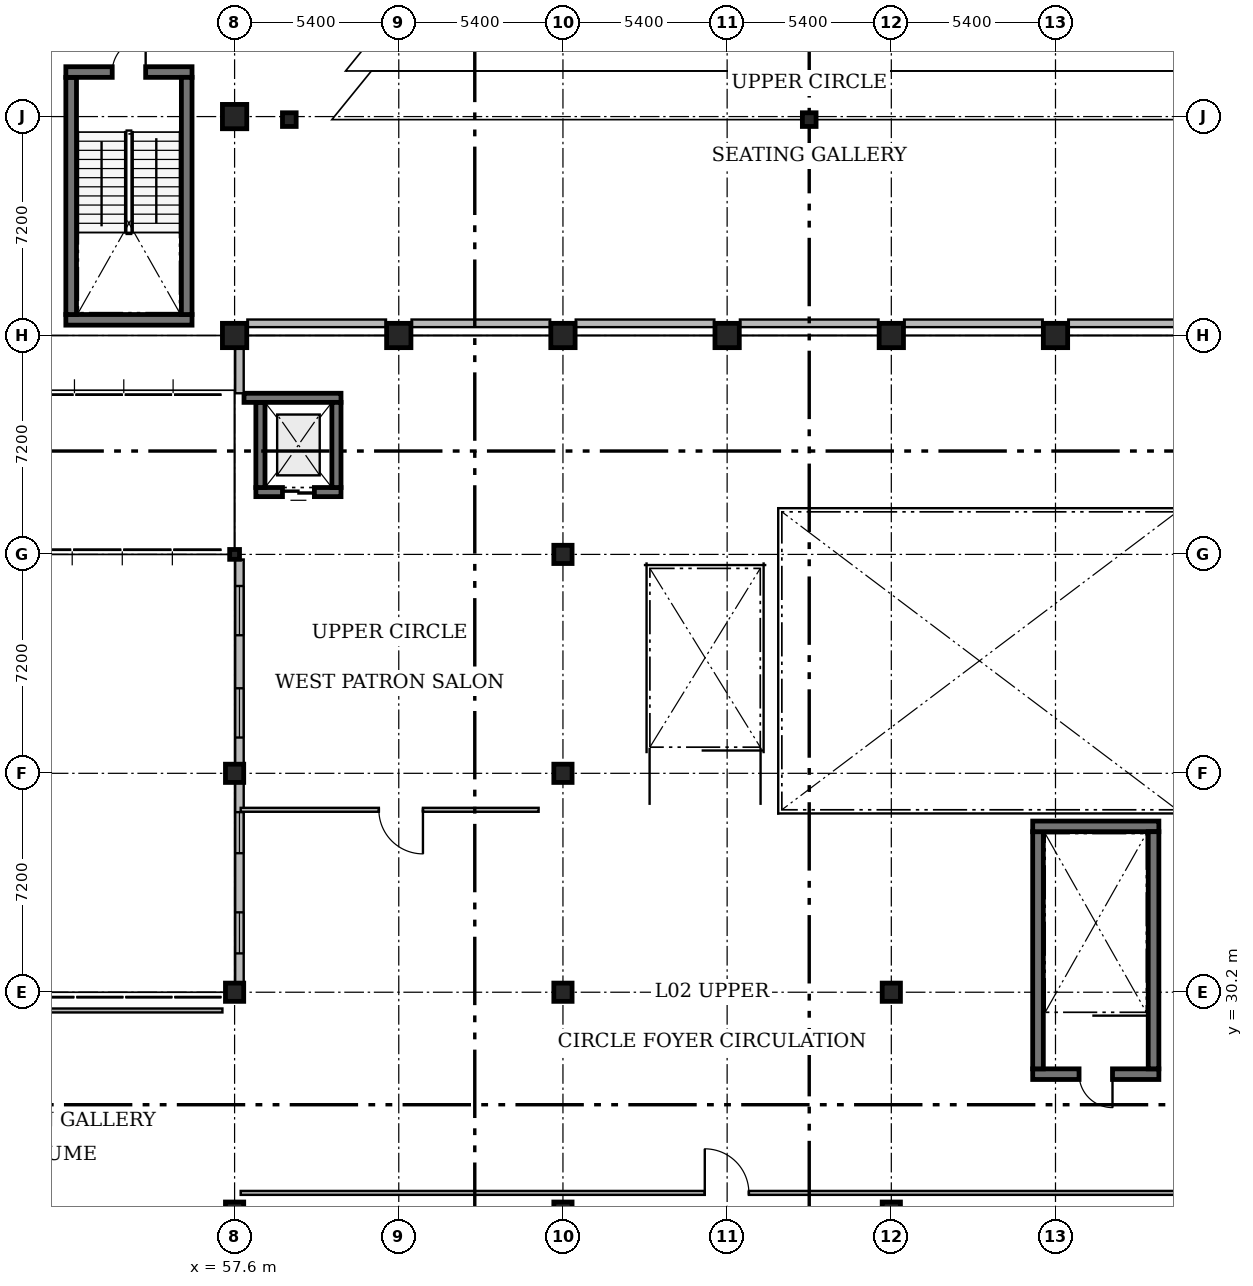
"""IFC4 building model, lengths in metres.
Left out: names, types, materials, properties, quantities, classifications, styles, units other than length and angle.
Written with IfcOpenShell. Run it as: python <this file> out.ifc"""

import sys

from ifc_helpers import new_model, si_unit, direction, frame, frame_2d, origin, origin_2d, place, context, subcontext, project, spatial, rectangle, circle, hollow_circle, extrude, element, fill, save


model = new_model("IFC4")
c1 = context("Model", 3, precision=1e-05, world=origin(), true_north=direction((0.0, 1.0)))
c2 = subcontext(c1, "Body", "Model", "MODEL_VIEW")
j1 = project(units=[si_unit("LENGTHUNIT", "METRE"), si_unit("PLANEANGLEUNIT", "RADIAN")], contexts=[c1])
p1 = place(None, origin())
s1 = spatial("IfcSite", under=j1, at=p1, CompositionType="ELEMENT")
p2 = place(p1, origin())
s2 = spatial("IfcBuilding", under=s1, at=p2, CompositionType="ELEMENT")
p3 = place(p2, frame((0.0, 0.0, 9.0)))
s3 = spatial("IfcBuildingStorey", under=s2, at=p3, CompositionType="ELEMENT", Elevation=9.0)
for number, where, z_axis, x_axis in (
    (1, (68.4, 23.0, 0.0), (0.0, 0.0, 1.0), (1.0, 0.0, 0.0)),
    (2, (68.4, 30.2, 0.0), (0.0, 0.0, 1.0), (1.0, 0.0, 0.0)),
    (3, (68.4, 37.4, 0.0), (0.0, 0.0, 1.0), (1.0, 0.0, 0.0)),
    (4, (68.4, 44.6, 0.0), (0.0, 0.0, 1.0), (1.0, 0.0, 0.0)),
):
    element("IfcColumn", number, at=place(p3, frame(where, z_axis=z_axis, x_axis=x_axis)), inside=s3, PredefinedType="COLUMN", context=c2, shape_type="SweptSolid", body=[
        extrude(circle(Radius=0.3, at=origin_2d()), origin(), (0.0, 0.0, 1.0), 4.2),
    ])
for number, where, z_axis, x_axis in (
    (5, (68.4, 51.8, 0.0), (0.0, 0.0, 1.0), (1.0, 0.0, 0.0)),
    (6, (73.8, 51.8, 0.0), (0.0, 0.0, 1.0), (1.0, 0.0, 0.0)),
):
    element("IfcColumn", number, at=place(p3, frame(where, z_axis=z_axis, x_axis=x_axis)), inside=s3, PredefinedType="COLUMN", context=c2, shape_type="SweptSolid", body=[
        extrude(rectangle(XDim=0.8, YDim=0.8, at=origin_2d()), origin(), (0.0, 0.0, 1.0), 4.2),
    ])
for number, where, z_axis, x_axis in (
    (7, (79.2, 23.0, 0.0), (0.0, 0.0, 1.0), (1.0, 0.0, 0.0)),
    (8, (79.2, 30.2, 0.0), (0.0, 0.0, 1.0), (1.0, 0.0, 0.0)),
):
    element("IfcColumn", number, at=place(p3, frame(where, z_axis=z_axis, x_axis=x_axis)), inside=s3, PredefinedType="COLUMN", context=c2, shape_type="SweptSolid", body=[
        extrude(circle(Radius=0.3, at=origin_2d()), origin(), (0.0, 0.0, 1.0), 4.2),
    ])
for number, where, z_axis, x_axis in (
    (9, (79.2, 51.8, 0.0), (0.0, 0.0, 1.0), (1.0, 0.0, 0.0)),
    (10, (84.6, 51.8, 0.0), (0.0, 0.0, 1.0), (1.0, 0.0, 0.0)),
):
    element("IfcColumn", number, at=place(p3, frame(where, z_axis=z_axis, x_axis=x_axis)), inside=s3, PredefinedType="COLUMN", context=c2, shape_type="SweptSolid", body=[
        extrude(rectangle(XDim=0.8, YDim=0.8, at=origin_2d()), origin(), (0.0, 0.0, 1.0), 4.2),
    ])
for number, where, z_axis, x_axis in (
    (11, (57.6, 23.0, 0.0), (0.0, 0.0, 1.0), (1.0, 0.0, 0.0)),
    (12, (57.6, 30.2, 0.0), (0.0, 0.0, 1.0), (1.0, 0.0, 0.0)),
    (13, (57.6, 37.4, 0.0), (0.0, 0.0, 1.0), (1.0, 0.0, 0.0)),
):
    element("IfcColumn", number, at=place(p3, frame(where, z_axis=z_axis, x_axis=x_axis)), inside=s3, PredefinedType="COLUMN", context=c2, shape_type="SweptSolid", body=[
        extrude(circle(Radius=0.3, at=origin_2d()), origin(), (0.0, 0.0, 1.0), 4.2),
    ])
p4 = place(p3, frame((57.6, 44.6, 0.0), z_axis=(0.0, 0.0, 1.0), x_axis=(1.0, 0.0, 0.0)))
e14 = element("IfcColumn", 14, at=p4, inside=s3, PredefinedType="COLUMN", context=c2, shape_type="SweptSolid", body=[
    extrude(hollow_circle(Radius=0.162, WallThickness=0.012, at=origin_2d()), origin(), (0.0, 0.0, 1.0), 4.2),
])
for number, where, z_axis, x_axis in (
    (15, (57.6, 51.8, 0.0), (0.0, 0.0, 1.0), (1.0, 0.0, 0.0)),
    (16, (57.6, 59.0, 0.0), (0.0, 0.0, 1.0), (1.0, 0.0, 0.0)),
    (17, (63.0, 51.8, 0.0), (0.0, 0.0, 1.0), (1.0, 0.0, 0.0)),
):
    element("IfcColumn", number, at=place(p3, frame(where, z_axis=z_axis, x_axis=x_axis)), inside=s3, PredefinedType="COLUMN", context=c2, shape_type="SweptSolid", body=[
        extrude(rectangle(XDim=0.8, YDim=0.8, at=origin_2d()), origin(), (0.0, 0.0, 1.0), 4.2),
    ])
for number, where, z_axis, x_axis in (
    (18, (59.4, 58.9, 0.0), (0.0, 0.0, 1.0), (1.0, 0.0, 0.0)),
    (19, (76.5, 58.9, 0.0), (0.0, 0.0, 1.0), (1.0, 0.0, 0.0)),
):
    element("IfcColumn", number, at=place(p3, frame(where, z_axis=z_axis, x_axis=x_axis)), inside=s3, PredefinedType="COLUMN", context=c2, shape_type="SweptSolid", body=[
        extrude(rectangle(XDim=0.45, YDim=0.45, at=origin_2d()), origin(), (0.0, 0.0, 1.0), 1.05),
    ])
p5 = place(p3, frame((61.1, 46.65, 0.0), z_axis=(0.0, 0.0, 1.0), x_axis=(-1.0, 0.0, 0.0)))
e20 = element("IfcWall", 20, at=p5, inside=s3, PredefinedType="SOLIDWALL", context=c2, shape_type="SweptSolid", body=[
    extrude(rectangle(XDim=2.8, YDim=0.3, at=frame_2d((1.4, 0.0))), origin(), (0.0, 0.0, 1.0), 4.5),
])
p6 = place(p5, frame((0.875, 0.0, 0.0)))
e21 = element("IfcOpeningElement", 21, at=p6, cuts=e20, PredefinedType="OPENING", context=c2, shape_type="SweptSolid", body=[
    extrude(rectangle(XDim=1.05, YDim=2.1, at=frame_2d((0.525, 1.05))), frame((0.0, 0.17, 0.0), z_axis=(0.0, -1.0, 0.0), x_axis=(1.0, 0.0, 0.0)), (0.0, 0.0, 1.0), 0.34),
])
p7 = place(p3, frame((58.45, 46.8, 0.0), z_axis=(0.0, 0.0, 1.0), x_axis=(0.0, 1.0, 0.0)))
e22 = element("IfcWall", 22, at=p7, inside=s3, PredefinedType="SOLIDWALL", context=c2, shape_type="SweptSolid", body=[
    extrude(rectangle(XDim=2.8, YDim=0.3, at=frame_2d((1.4, 0.0))), origin(), (0.0, 0.0, 1.0), 4.5),
])
p8 = place(p3, frame((57.91, 49.75, 0.0), z_axis=(0.0, 0.0, 1.0), x_axis=(1.0, 0.0, 0.0)))
e23 = element("IfcWall", 23, at=p8, inside=s3, PredefinedType="SOLIDWALL", context=c2, shape_type="SweptSolid", body=[
    extrude(rectangle(XDim=3.19, YDim=0.3, at=frame_2d((1.595, 0.0))), origin(), (0.0, 0.0, 1.0), 4.5),
])
p9 = place(p3, frame((60.95, 49.6, 0.0), z_axis=(0.0, 0.0, 1.0), x_axis=(0.0, -1.0, 0.0)))
e24 = element("IfcWall", 24, at=p9, inside=s3, PredefinedType="SOLIDWALL", context=c2, shape_type="SweptSolid", body=[
    extrude(rectangle(XDim=2.8, YDim=0.3, at=frame_2d((1.4, 0.0))), origin(), (0.0, 0.0, 1.0), 4.5),
])
p10 = place(p3, frame((56.2, 52.315, 0.0), z_axis=(0.0, 0.0, 1.0), x_axis=(-1.0, 0.0, 0.0)))
e25 = element("IfcWall", 25, at=p10, inside=s3, PredefinedType="SOLIDWALL", context=c2, shape_type="SweptSolid", body=[
    extrude(rectangle(XDim=4.15, YDim=0.35, at=frame_2d((2.075, 0.0))), origin(), (0.0, 0.0, 1.0), 4.2),
])
p11 = place(p3, frame((52.225, 52.49, 0.0), z_axis=(0.0, 0.0, 1.0), x_axis=(0.0, 1.0, 0.0)))
e26 = element("IfcWall", 26, at=p11, inside=s3, PredefinedType="SOLIDWALL", context=c2, shape_type="SweptSolid", body=[
    extrude(rectangle(XDim=7.8, YDim=0.35, at=frame_2d((3.9, 0.0))), origin(), (0.0, 0.0, 1.0), 4.2),
])
p12 = place(p3, frame((52.05, 60.465, 0.0), z_axis=(0.0, 0.0, 1.0), x_axis=(1.0, 0.0, 0.0)))
e27 = element("IfcWall", 27, at=p12, inside=s3, PredefinedType="SOLIDWALL", context=c2, shape_type="SweptSolid", body=[
    extrude(rectangle(XDim=4.15, YDim=0.35, at=frame_2d((2.075, 0.0))), origin(), (0.0, 0.0, 1.0), 4.2),
])
p13 = place(p12, frame((1.525, 0.0, 0.0)))
e28 = element("IfcOpeningElement", 28, at=p13, cuts=e27, PredefinedType="OPENING", context=c2, shape_type="SweptSolid", body=[
    extrude(rectangle(XDim=1.1, YDim=2.15, at=frame_2d((0.55, 1.075))), frame((0.0, 0.195, 0.0), z_axis=(0.0, -1.0, 0.0), x_axis=(1.0, 0.0, 0.0)), (0.0, 0.0, 1.0), 0.39),
])
p14 = place(p3, frame((56.025, 60.29, 0.0), z_axis=(0.0, 0.0, 1.0), x_axis=(0.0, -1.0, 0.0)))
e29 = element("IfcWall", 29, at=p14, inside=s3, PredefinedType="SOLIDWALL", context=c2, shape_type="SweptSolid", body=[
    extrude(rectangle(XDim=7.8, YDim=0.35, at=frame_2d((3.9, 0.0))), origin(), (0.0, 0.0, 1.0), 4.2),
])
p15 = place(p3, frame((88.0, 27.505, 0.0), z_axis=(0.0, 0.0, 1.0), x_axis=(-1.0, 0.0, 0.0)))
e30 = element("IfcWall", 30, at=p15, inside=s3, PredefinedType="SOLIDWALL", context=c2, shape_type="SweptSolid", body=[
    extrude(rectangle(XDim=4.15, YDim=0.35, at=frame_2d((2.075, 0.0))), origin(), (0.0, 0.0, 1.0), 4.5),
])
p16 = place(p15, frame((1.525, 0.0, 0.0)))
e31 = element("IfcOpeningElement", 31, at=p16, cuts=e30, PredefinedType="OPENING", context=c2, shape_type="SweptSolid", body=[
    extrude(rectangle(XDim=1.1, YDim=2.15, at=frame_2d((0.55, 1.075))), frame((0.0, 0.195, 0.0), z_axis=(0.0, -1.0, 0.0), x_axis=(1.0, 0.0, 0.0)), (0.0, 0.0, 1.0), 0.39),
])
p17 = place(p3, frame((84.025, 27.68, 0.0), z_axis=(0.0, 0.0, 1.0), x_axis=(0.0, 1.0, 0.0)))
e32 = element("IfcWall", 32, at=p17, inside=s3, PredefinedType="SOLIDWALL", context=c2, shape_type="SweptSolid", body=[
    extrude(rectangle(XDim=7.8, YDim=0.35, at=frame_2d((3.9, 0.0))), origin(), (0.0, 0.0, 1.0), 4.5),
])
p18 = place(p3, frame((83.85, 35.655, 0.0), z_axis=(0.0, 0.0, 1.0), x_axis=(1.0, 0.0, 0.0)))
e33 = element("IfcWall", 33, at=p18, inside=s3, PredefinedType="SOLIDWALL", context=c2, shape_type="SweptSolid", body=[
    extrude(rectangle(XDim=4.15, YDim=0.35, at=frame_2d((2.075, 0.0))), origin(), (0.0, 0.0, 1.0), 4.5),
])
p19 = place(p3, frame((87.825, 35.48, 0.0), z_axis=(0.0, 0.0, 1.0), x_axis=(0.0, -1.0, 0.0)))
e34 = element("IfcWall", 34, at=p19, inside=s3, PredefinedType="SOLIDWALL", context=c2, shape_type="SweptSolid", body=[
    extrude(rectangle(XDim=7.8, YDim=0.35, at=frame_2d((3.9, 0.0))), origin(), (0.0, 0.0, 1.0), 4.5),
])
p20 = place(p3, frame((57.76, 30.505, 0.0), z_axis=(0.0, 0.0, 1.0), x_axis=(0.0, 1.0, 0.0)))
e35 = element("IfcWall", 35, at=p20, inside=s3, PredefinedType="SOLIDWALL", context=c2, shape_type="SweptSolid", body=[
    extrude(rectangle(XDim=6.59, YDim=0.28, at=frame_2d((3.295, 0.0))), origin(), (0.0, 0.0, 1.0), 3.673),
])
p21 = place(p20, frame((0.972, 0.0, 0.95)))
e36 = element("IfcOpeningElement", 36, at=p21, cuts=e35, PredefinedType="OPENING", context=c2, shape_type="SweptSolid", body=[
    extrude(rectangle(XDim=1.35, YDim=1.95, at=frame_2d((0.675, 0.975))), frame((0.0, 0.16, 0.0), z_axis=(0.0, -1.0, 0.0), x_axis=(1.0, 0.0, 0.0)), (0.0, 0.0, 1.0), 0.32),
])
p22 = place(p20, frame((4.268, 0.0, 0.95)))
e37 = element("IfcOpeningElement", 37, at=p22, cuts=e35, PredefinedType="OPENING", context=c2, shape_type="SweptSolid", body=[
    extrude(rectangle(XDim=1.35, YDim=1.95, at=frame_2d((0.675, 0.975))), frame((0.0, 0.16, 0.0), z_axis=(0.0, -1.0, 0.0), x_axis=(1.0, 0.0, 0.0)), (0.0, 0.0, 1.0), 0.32),
])
p23 = place(p3, frame((57.76, 37.705, 0.0), z_axis=(0.0, 0.0, 1.0), x_axis=(0.0, 1.0, 0.0)))
e38 = element("IfcWall", 38, at=p23, inside=s3, PredefinedType="SOLIDWALL", context=c2, shape_type="SweptSolid", body=[
    extrude(rectangle(XDim=6.728, YDim=0.28, at=frame_2d((3.364, 0.0))), origin(), (0.0, 0.0, 1.0), 3.673),
])
p24 = place(p23, frame((0.872, 0.0, 0.95)))
e39 = element("IfcOpeningElement", 39, at=p24, cuts=e38, PredefinedType="OPENING", context=c2, shape_type="SweptSolid", body=[
    extrude(rectangle(XDim=1.62, YDim=2.0, at=frame_2d((0.81, 1.0))), frame((0.0, 0.16, 0.0), z_axis=(0.0, -1.0, 0.0), x_axis=(1.0, 0.0, 0.0)), (0.0, 0.0, 1.0), 0.32),
])
p25 = place(p23, frame((4.236, 0.0, 0.95)))
e40 = element("IfcOpeningElement", 40, at=p25, cuts=e38, PredefinedType="OPENING", context=c2, shape_type="SweptSolid", body=[
    extrude(rectangle(XDim=1.62, YDim=2.0, at=frame_2d((0.81, 1.0))), frame((0.0, 0.16, 0.0), z_axis=(0.0, -1.0, 0.0), x_axis=(1.0, 0.0, 0.0)), (0.0, 0.0, 1.0), 0.32),
])
p26 = place(p3, frame((57.76, 49.9, 0.0), z_axis=(0.0, 0.0, 1.0), x_axis=(0.0, 1.0, 0.0)))
e41 = element("IfcWall", 41, at=p26, inside=s3, PredefinedType="SOLIDWALL", context=c2, shape_type="SweptSolid", body=[
    extrude(rectangle(XDim=1.95, YDim=0.28, at=frame_2d((0.975, 0.0))), origin(), (0.0, 0.0, 1.0), 3.573),
])
p27 = place(p3, frame((89.58, 52.2, 0.0), z_axis=(0.0, 0.0, 1.0), x_axis=(-1.0, 0.0, 0.0)))
e42 = element("IfcWall", 42, at=p27, inside=s3, PredefinedType="PARTITIONING", context=c2, shape_type="SweptSolid", body=[
    extrude(rectangle(XDim=4.56, YDim=0.25, at=frame_2d((2.28, 0.0))), origin(), (0.0, 0.0, 1.0), 3.95),
])
p28 = place(p3, frame((84.18, 52.2, 0.0), z_axis=(0.0, 0.0, 1.0), x_axis=(-1.0, 0.0, 0.0)))
e43 = element("IfcWall", 43, at=p28, inside=s3, PredefinedType="PARTITIONING", context=c2, shape_type="SweptSolid", body=[
    extrude(rectangle(XDim=4.56, YDim=0.25, at=frame_2d((2.28, 0.0))), origin(), (0.0, 0.0, 1.0), 3.95),
])
p29 = place(p3, frame((78.78, 52.2, 0.0), z_axis=(0.0, 0.0, 1.0), x_axis=(-1.0, 0.0, 0.0)))
e44 = element("IfcWall", 44, at=p29, inside=s3, PredefinedType="PARTITIONING", context=c2, shape_type="SweptSolid", body=[
    extrude(rectangle(XDim=4.56, YDim=0.25, at=frame_2d((2.28, 0.0))), origin(), (0.0, 0.0, 1.0), 3.95),
])
p30 = place(p3, frame((73.38, 52.2, 0.0), z_axis=(0.0, 0.0, 1.0), x_axis=(-1.0, 0.0, 0.0)))
e45 = element("IfcWall", 45, at=p30, inside=s3, PredefinedType="PARTITIONING", context=c2, shape_type="SweptSolid", body=[
    extrude(rectangle(XDim=4.56, YDim=0.25, at=frame_2d((2.28, 0.0))), origin(), (0.0, 0.0, 1.0), 3.95),
])
for number, where, z_axis, x_axis in (
    (46, (67.98, 52.2, 0.0), (0.0, 0.0, 1.0), (-1.0, 0.0, 0.0)),
    (47, (62.58, 52.2, 0.0), (0.0, 0.0, 1.0), (-1.0, 0.0, 0.0)),
):
    element("IfcWall", number, at=place(p3, frame(where, z_axis=z_axis, x_axis=x_axis)), inside=s3, PredefinedType="PARTITIONING", context=c2, shape_type="SweptSolid", body=[
        extrude(rectangle(XDim=4.56, YDim=0.25, at=frame_2d((2.28, 0.0))), origin(), (0.0, 0.0, 1.0), 3.95),
    ])
p31 = place(p3, frame((42.0, 29.6, 0.0), z_axis=(0.0, 0.0, 1.0), x_axis=(1.0, 0.0, 0.0)))
e48 = element("IfcWall", 48, at=p31, inside=s3, PredefinedType="PARTITIONING", context=c2, shape_type="SweptSolid", body=[
    extrude(rectangle(XDim=15.2, YDim=0.13, at=frame_2d((7.6, 0.0))), origin(), (0.0, 0.0, 1.0), 3.96),
])
p32 = place(p3, frame((57.8, 23.6, 0.0), z_axis=(0.0, 0.0, 1.0), x_axis=(1.0, 0.0, 0.0)))
e49 = element("IfcWall", 49, at=p32, inside=s3, PredefinedType="PARTITIONING", context=c2, shape_type="SweptSolid", body=[
    extrude(rectangle(XDim=37.2, YDim=0.13, at=frame_2d((18.6, 0.0))), origin(), (0.0, 0.0, 1.0), 3.96),
])
p33 = place(p32, frame((15.265, 0.0, 0.0)))
e50 = element("IfcOpeningElement", 50, at=p33, cuts=e49, PredefinedType="OPENING", context=c2, shape_type="SweptSolid", body=[
    extrude(rectangle(XDim=1.45, YDim=2.2, at=frame_2d((0.725, 1.1))), frame((0.0, 0.085, 0.0), z_axis=(0.0, -1.0, 0.0), x_axis=(1.0, 0.0, 0.0)), (0.0, 0.0, 1.0), 0.17),
])
p34 = place(p3, frame((67.6, 36.2, 0.0), z_axis=(0.0, 0.0, 1.0), x_axis=(-1.0, 0.0, 0.0)))
e51 = element("IfcWall", 51, at=p34, inside=s3, PredefinedType="PARTITIONING", context=c2, shape_type="SweptSolid", body=[
    extrude(rectangle(XDim=9.8, YDim=0.13, at=frame_2d((4.9, 0.0))), origin(), (0.0, 0.0, 1.0), 3.96),
])
p35 = place(p34, frame((3.805, 0.0, 0.0)))
e52 = element("IfcOpeningElement", 52, at=p35, cuts=e51, PredefinedType="OPENING", context=c2, shape_type="SweptSolid", body=[
    extrude(rectangle(XDim=1.45, YDim=2.2, at=frame_2d((0.725, 1.1))), frame((0.0, 0.085, 0.0), z_axis=(0.0, -1.0, 0.0), x_axis=(1.0, 0.0, 0.0)), (0.0, 0.0, 1.0), 0.17),
])
p36 = place(p6, origin())
e53 = element("IfcDoor", 53, at=p36, inside=s3, OperationType="DOUBLE_DOOR_SLIDING", PredefinedType="DOOR", context=c2, shape_type="SweptSolid", body=[
    extrude(rectangle(XDim=1.05, YDim=2.1, at=frame_2d((0.525, 1.05))), frame((0.0, 0.025, 0.0), z_axis=(0.0, -1.0, 0.0), x_axis=(1.0, 0.0, 0.0)), (0.0, 0.0, 1.0), 0.05),
])
fill(e21, e53)
p37 = place(p13, origin())
e54 = element("IfcDoor", 54, at=p37, inside=s3, OperationType="SINGLE_SWING_RIGHT", PredefinedType="DOOR", context=c2, shape_type="SweptSolid", body=[
    extrude(rectangle(XDim=1.1, YDim=2.15, at=frame_2d((0.55, 1.075))), frame((0.0, 0.025, 0.0), z_axis=(0.0, -1.0, 0.0), x_axis=(1.0, 0.0, 0.0)), (0.0, 0.0, 1.0), 0.05),
])
fill(e28, e54)
p38 = place(p16, origin())
e55 = element("IfcDoor", 55, at=p38, inside=s3, OperationType="SINGLE_SWING_LEFT", PredefinedType="DOOR", context=c2, shape_type="SweptSolid", body=[
    extrude(rectangle(XDim=1.1, YDim=2.15, at=frame_2d((0.55, 1.075))), frame((0.0, 0.025, 0.0), z_axis=(0.0, -1.0, 0.0), x_axis=(1.0, 0.0, 0.0)), (0.0, 0.0, 1.0), 0.05),
])
fill(e31, e55)
p39 = place(p21, origin())
e56 = element("IfcWindow", 56, at=p39, inside=s3, PartitioningType="SINGLE_PANEL", PredefinedType="WINDOW", context=c2, shape_type="SweptSolid", body=[
    extrude(rectangle(XDim=1.35, YDim=1.95, at=frame_2d((0.675, 0.975))), frame((0.0, 0.03, 0.0), z_axis=(0.0, -1.0, 0.0), x_axis=(1.0, 0.0, 0.0)), (0.0, 0.0, 1.0), 0.06),
])
fill(e36, e56)
p40 = place(p22, origin())
e57 = element("IfcWindow", 57, at=p40, inside=s3, PartitioningType="SINGLE_PANEL", PredefinedType="WINDOW", context=c2, shape_type="SweptSolid", body=[
    extrude(rectangle(XDim=1.35, YDim=1.95, at=frame_2d((0.675, 0.975))), frame((0.0, 0.03, 0.0), z_axis=(0.0, -1.0, 0.0), x_axis=(1.0, 0.0, 0.0)), (0.0, 0.0, 1.0), 0.06),
])
fill(e37, e57)
p41 = place(p24, origin())
e58 = element("IfcWindow", 58, at=p41, inside=s3, PartitioningType="SINGLE_PANEL", PredefinedType="WINDOW", context=c2, shape_type="SweptSolid", body=[
    extrude(rectangle(XDim=1.62, YDim=2.0, at=frame_2d((0.81, 1.0))), frame((0.0, 0.03, 0.0), z_axis=(0.0, -1.0, 0.0), x_axis=(1.0, 0.0, 0.0)), (0.0, 0.0, 1.0), 0.06),
])
fill(e39, e58)
p42 = place(p25, origin())
e59 = element("IfcWindow", 59, at=p42, inside=s3, PartitioningType="SINGLE_PANEL", PredefinedType="WINDOW", context=c2, shape_type="SweptSolid", body=[
    extrude(rectangle(XDim=1.62, YDim=2.0, at=frame_2d((0.81, 1.0))), frame((0.0, 0.03, 0.0), z_axis=(0.0, -1.0, 0.0), x_axis=(1.0, 0.0, 0.0)), (0.0, 0.0, 1.0), 0.06),
])
fill(e40, e59)
p43 = place(p33, origin())
e60 = element("IfcDoor", 60, at=p43, inside=s3, OperationType="DOUBLE_DOOR_SINGLE_SWING", PredefinedType="DOOR", context=c2, shape_type="SweptSolid", body=[
    extrude(rectangle(XDim=1.45, YDim=2.2, at=frame_2d((0.725, 1.1))), frame((0.0, 0.025, 0.0), z_axis=(0.0, -1.0, 0.0), x_axis=(1.0, 0.0, 0.0)), (0.0, 0.0, 1.0), 0.05),
])
fill(e50, e60)
p44 = place(p35, origin())
e61 = element("IfcDoor", 61, at=p44, inside=s3, OperationType="DOUBLE_DOOR_SINGLE_SWING", PredefinedType="DOOR", context=c2, shape_type="SweptSolid", body=[
    extrude(rectangle(XDim=1.45, YDim=2.2, at=frame_2d((0.725, 1.1))), frame((0.0, 0.025, 0.0), z_axis=(0.0, -1.0, 0.0), x_axis=(1.0, 0.0, 0.0)), (0.0, 0.0, 1.0), 0.05),
])
fill(e52, e61)
save(model, sys.argv[1])
